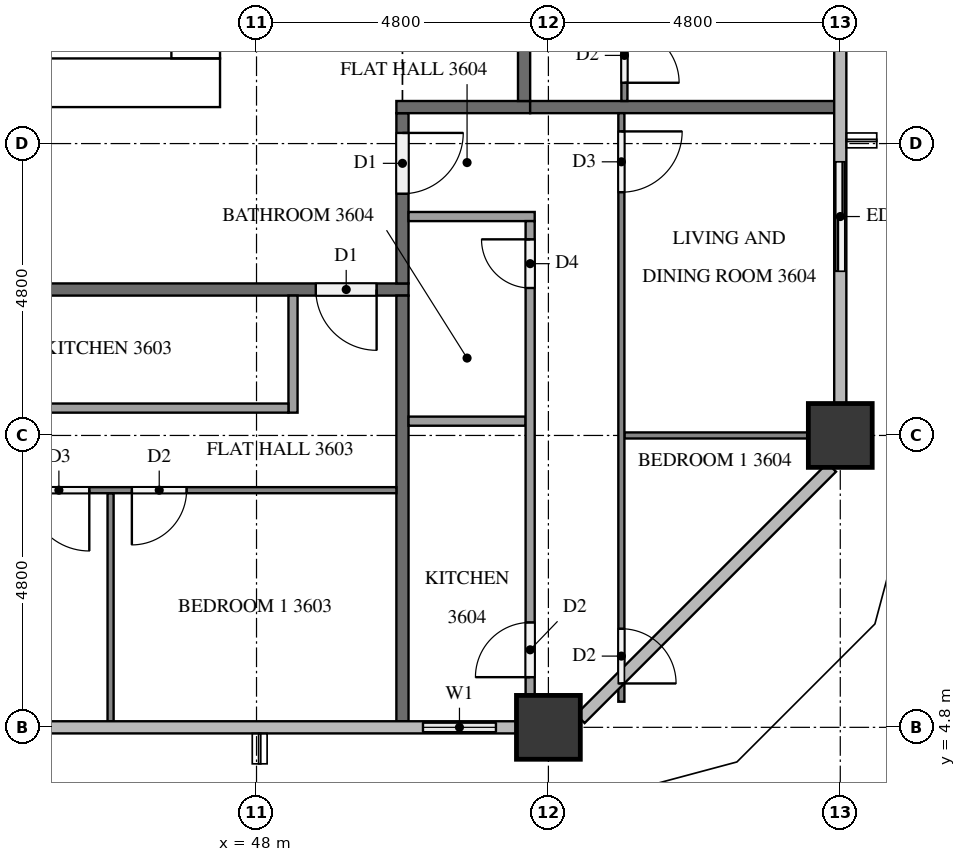
"""IFC4 building model, lengths in metres.
Left out: names, types, materials, properties, quantities, classifications, styles, units other than length and angle.
Written with IfcOpenShell. Run it as: python <this file> out.ifc"""

import sys

from ifc_helpers import new_model, si_unit, direction, frame, frame_2d, origin, origin_2d, place, context, subcontext, project, spatial, rectangle, extrude, element, fill, save


model = new_model("IFC4")
c1 = context("Model", 3, precision=1e-05, world=origin(), true_north=direction((0.0, 1.0)))
c2 = subcontext(c1, "Body", "Model", "MODEL_VIEW")
j1 = project(units=[si_unit("LENGTHUNIT", "METRE"), si_unit("PLANEANGLEUNIT", "RADIAN")], contexts=[c1])
p1 = place(None, origin())
s1 = spatial("IfcSite", under=j1, at=p1, CompositionType="ELEMENT")
p2 = place(p1, origin())
s2 = spatial("IfcBuilding", under=s1, at=p2, CompositionType="ELEMENT")
p3 = place(p2, frame((0.0, 0.0, 140.1)))
s3 = spatial("IfcBuildingStorey", under=s2, at=p3, CompositionType="ELEMENT", Elevation=140.1)
p4 = place(p3, frame((15.0, 15.4, 0.0), z_axis=(0.0, 0.0, 1.0), x_axis=(1.0, 0.0, 0.0)))
e1 = element("IfcWall", 1, at=p4, inside=s3, PredefinedType="SHEAR", context=c2, shape_type="SweptSolid", body=[
    extrude(rectangle(XDim=32.4, YDim=0.8, at=frame_2d((16.2, 0.0))), origin(), (0.0, 0.0, 1.0), 3.1),
])
p5 = place(p4, frame((15.3, 0.0, 0.0)))
e2 = element("IfcOpeningElement", 2, at=p5, cuts=e1, PredefinedType="OPENING", context=c2, shape_type="SweptSolid", body=[
    extrude(rectangle(XDim=1.8, YDim=2.1, at=frame_2d((0.9, 1.05))), frame((0.0, 0.41, 0.0), z_axis=(0.0, -1.0, 0.0), x_axis=(1.0, 0.0, 0.0)), (0.0, 0.0, 1.0), 0.82),
])
p6 = place(p3, frame((47.0, 15.8, 0.0), z_axis=(0.0, 0.0, 1.0), x_axis=(0.0, 1.0, 0.0)))
e3 = element("IfcWall", 3, at=p6, inside=s3, PredefinedType="SHEAR", context=c2, shape_type="SweptSolid", body=[
    extrude(rectangle(XDim=21.2, YDim=0.8, at=frame_2d((10.6, 0.0))), origin(), (0.0, 0.0, 1.0), 3.1),
])
p7 = place(p6, frame((10.3, 0.0, 0.0)))
e4 = element("IfcOpeningElement", 4, at=p7, cuts=e3, PredefinedType="OPENING", context=c2, shape_type="SweptSolid", body=[
    extrude(rectangle(XDim=1.2, YDim=2.1, at=frame_2d((0.6, 1.05))), frame((0.0, 0.41, 0.0), z_axis=(0.0, -1.0, 0.0), x_axis=(1.0, 0.0, 0.0)), (0.0, 0.0, 1.0), 0.82),
])
for number, where, z_axis, x_axis in (
    (5, (52.8, 4.8, 0.0), (0.0, 0.0, 1.0), (1.0, 0.0, 0.0)),
    (6, (57.6, 9.6, 0.0), (0.0, 0.0, 1.0), (1.0, 0.0, 0.0)),
):
    element("IfcColumn", number, at=place(p3, frame(where, z_axis=z_axis, x_axis=x_axis)), inside=s3, PredefinedType="COLUMN", context=c2, shape_type="SweptSolid", body=[
        extrude(rectangle(XDim=1.05, YDim=1.05, at=origin_2d()), origin(), (0.0, 0.0, 1.0), 3.1),
    ])
p8 = place(p3, frame((50.4, 4.8, 0.0), z_axis=(0.0, 0.0, 1.0), x_axis=(1.0, 0.0, 0.0)))
e7 = element("IfcWall", 7, at=p8, inside=s3, PredefinedType="SOLIDWALL", context=c2, shape_type="SweptSolid", body=[
    extrude(rectangle(XDim=1.875, YDim=0.15, at=frame_2d((0.938, 0.0))), origin(), (0.0, 0.0, 1.0), 3.1),
])
p9 = place(p8, frame((0.337, 0.0, 0.9)))
e8 = element("IfcOpeningElement", 8, at=p9, cuts=e7, PredefinedType="OPENING", context=c2, shape_type="SweptSolid", body=[
    extrude(rectangle(XDim=1.2, YDim=1.4, at=frame_2d((0.6, 0.7))), frame((0.0, 0.085, 0.0), z_axis=(0.0, -1.0, 0.0), x_axis=(1.0, 0.0, 0.0)), (0.0, 0.0, 1.0), 0.17),
])
p10 = place(p3, frame((57.6, 12.0, 0.0), z_axis=(0.0, 0.0, 1.0), x_axis=(0.0, 1.0, 0.0)))
e9 = element("IfcWall", 9, at=p10, inside=s3, PredefinedType="SOLIDWALL", context=c2, shape_type="SweptSolid", body=[
    extrude(rectangle(XDim=2.4, YDim=0.15, at=frame_2d((1.2, 0.0))), origin(), (0.0, 0.0, 1.0), 3.1),
])
p11 = place(p10, frame((0.3, 0.0, 0.0)))
e10 = element("IfcOpeningElement", 10, at=p11, cuts=e9, PredefinedType="OPENING", context=c2, shape_type="SweptSolid", body=[
    extrude(rectangle(XDim=1.8, YDim=2.4, at=frame_2d((0.9, 1.2))), frame((0.0, 0.085, 0.0), z_axis=(0.0, -1.0, 0.0), x_axis=(1.0, 0.0, 0.0)), (0.0, 0.0, 1.0), 0.17),
])
p12 = place(p3, frame((50.5, 12.0, 0.0), z_axis=(0.0, 0.0, 1.0), x_axis=(-1.0, 0.0, 0.0)))
e11 = element("IfcWall", 11, at=p12, inside=s3, PredefinedType="PARTITIONING", context=c2, shape_type="SweptSolid", body=[
    extrude(rectangle(XDim=38.6, YDim=0.2, at=frame_2d((19.3, 0.0))), origin(), (0.0, 0.0, 1.0), 3.1),
])
p13 = place(p12, frame((37.075, 0.0, 0.0)))
e12 = element("IfcOpeningElement", 12, at=p13, cuts=e11, PredefinedType="OPENING", context=c2, shape_type="SweptSolid", body=[
    extrude(rectangle(XDim=1.0, YDim=2.1, at=frame_2d((0.5, 1.05))), frame((0.0, 0.11, 0.0), z_axis=(0.0, -1.0, 0.0), x_axis=(1.0, 0.0, 0.0)), (0.0, 0.0, 1.0), 0.22),
])
p14 = place(p12, frame((27.475, 0.0, 0.0)))
e13 = element("IfcOpeningElement", 13, at=p14, cuts=e11, PredefinedType="OPENING", context=c2, shape_type="SweptSolid", body=[
    extrude(rectangle(XDim=1.0, YDim=2.1, at=frame_2d((0.5, 1.05))), frame((0.0, 0.11, 0.0), z_axis=(0.0, -1.0, 0.0), x_axis=(1.0, 0.0, 0.0)), (0.0, 0.0, 1.0), 0.22),
])
p15 = place(p12, frame((0.525, 0.0, 0.0)))
e14 = element("IfcOpeningElement", 14, at=p15, cuts=e11, PredefinedType="OPENING", context=c2, shape_type="SweptSolid", body=[
    extrude(rectangle(XDim=1.0, YDim=2.1, at=frame_2d((0.5, 1.05))), frame((0.0, 0.11, 0.0), z_axis=(0.0, -1.0, 0.0), x_axis=(1.0, 0.0, 0.0)), (0.0, 0.0, 1.0), 0.22),
])
p16 = place(p3, frame((50.4, 14.9, 0.0), z_axis=(0.0, 0.0, 1.0), x_axis=(0.0, -1.0, 0.0)))
e15 = element("IfcWall", 15, at=p16, inside=s3, PredefinedType="PARTITIONING", context=c2, shape_type="SweptSolid", body=[
    extrude(rectangle(XDim=2.8, YDim=0.2, at=frame_2d((1.4, 0.0))), origin(), (0.0, 0.0, 1.0), 3.1),
])
p17 = place(p16, frame((0.325, 0.0, 0.0)))
e16 = element("IfcOpeningElement", 16, at=p17, cuts=e15, PredefinedType="OPENING", context=c2, shape_type="SweptSolid", body=[
    extrude(rectangle(XDim=1.0, YDim=2.1, at=frame_2d((0.5, 1.05))), frame((0.0, 0.11, 0.0), z_axis=(0.0, -1.0, 0.0), x_axis=(1.0, 0.0, 0.0)), (0.0, 0.0, 1.0), 0.22),
])
p18 = place(p3, frame((50.3, 15.0, 0.0), z_axis=(0.0, 0.0, 1.0), x_axis=(1.0, 0.0, 0.0)))
e17 = element("IfcWall", 17, at=p18, inside=s3, PredefinedType="PARTITIONING", context=c2, shape_type="SweptSolid", body=[
    extrude(rectangle(XDim=2.2, YDim=0.2, at=frame_2d((1.1, 0.0))), origin(), (0.0, 0.0, 1.0), 3.1),
])
p19 = place(p3, frame((52.4, 37.7, 0.0), z_axis=(0.0, 0.0, 1.0), x_axis=(0.0, -1.0, 0.0)))
e18 = element("IfcWall", 18, at=p19, inside=s3, PredefinedType="PARTITIONING", context=c2, shape_type="SweptSolid", body=[
    extrude(rectangle(XDim=22.6, YDim=0.2, at=frame_2d((11.3, 0.0))), origin(), (0.0, 0.0, 1.0), 3.1),
])
p20 = place(p19, frame((14.125, 0.0, 0.0)))
e19 = element("IfcOpeningElement", 19, at=p20, cuts=e18, PredefinedType="OPENING", context=c2, shape_type="SweptSolid", body=[
    extrude(rectangle(XDim=1.0, YDim=2.1, at=frame_2d((0.5, 1.05))), frame((0.0, 0.11, 0.0), z_axis=(0.0, -1.0, 0.0), x_axis=(1.0, 0.0, 0.0)), (0.0, 0.0, 1.0), 0.22),
])
p21 = place(p19, frame((0.325, 0.0, 0.0)))
e20 = element("IfcOpeningElement", 20, at=p21, cuts=e18, PredefinedType="OPENING", context=c2, shape_type="SweptSolid", body=[
    extrude(rectangle(XDim=1.0, YDim=2.1, at=frame_2d((0.5, 1.05))), frame((0.0, 0.11, 0.0), z_axis=(0.0, -1.0, 0.0), x_axis=(1.0, 0.0, 0.0)), (0.0, 0.0, 1.0), 0.22),
])
p22 = place(p3, frame((50.4, 11.9, 0.0), z_axis=(0.0, 0.0, 1.0), x_axis=(0.0, -1.0, 0.0)))
e21 = element("IfcWall", 21, at=p22, inside=s3, PredefinedType="PARTITIONING", context=c2, shape_type="SweptSolid", body=[
    extrude(rectangle(XDim=7.0, YDim=0.2, at=frame_2d((3.5, 0.0))), origin(), (0.0, 0.0, 1.0), 3.1),
])
p23 = place(p3, frame((52.5, 15.0, 0.0), z_axis=(0.0, 0.0, 1.0), x_axis=(1.0, 0.0, 0.0)))
e22 = element("IfcWall", 22, at=p23, inside=s3, PredefinedType="PARTITIONING", context=c2, shape_type="SweptSolid", body=[
    extrude(rectangle(XDim=5.0, YDim=0.2, at=frame_2d((2.5, 0.0))), origin(), (0.0, 0.0, 1.0), 3.1),
])
p24 = place(p3, frame((45.6, 8.65, 0.0), z_axis=(0.0, 0.0, 1.0), x_axis=(0.0, -1.0, 0.0)))
e23 = element("IfcWall", 23, at=p24, inside=s3, PredefinedType="PARTITIONING", context=c2, shape_type="SweptSolid", body=[
    extrude(rectangle(XDim=3.75, YDim=0.1, at=frame_2d((1.875, 0.0))), origin(), (0.0, 0.0, 1.0), 3.1),
])
p25 = place(p3, frame((50.3, 8.7, 0.0), z_axis=(0.0, 0.0, 1.0), x_axis=(-1.0, 0.0, 0.0)))
e24 = element("IfcWall", 24, at=p25, inside=s3, PredefinedType="PARTITIONING", context=c2, shape_type="SweptSolid", body=[
    extrude(rectangle(XDim=11.8, YDim=0.1, at=frame_2d((5.9, 0.0))), origin(), (0.0, 0.0, 1.0), 3.1),
])
p26 = place(p25, frame((3.45, 0.0, 0.0)))
e25 = element("IfcOpeningElement", 25, at=p26, cuts=e24, PredefinedType="OPENING", context=c2, shape_type="SweptSolid", body=[
    extrude(rectangle(XDim=0.9, YDim=2.1, at=frame_2d((0.45, 1.05))), frame((0.0, 0.06, 0.0), z_axis=(0.0, -1.0, 0.0), x_axis=(1.0, 0.0, 0.0)), (0.0, 0.0, 1.0), 0.12),
])
p27 = place(p25, frame((5.05, 0.0, 0.0)))
e26 = element("IfcOpeningElement", 26, at=p27, cuts=e24, PredefinedType="OPENING", context=c2, shape_type="SweptSolid", body=[
    extrude(rectangle(XDim=1.0, YDim=2.1, at=frame_2d((0.5, 1.05))), frame((0.0, 0.06, 0.0), z_axis=(0.0, -1.0, 0.0), x_axis=(1.0, 0.0, 0.0)), (0.0, 0.0, 1.0), 0.12),
])
p28 = place(p3, frame((48.6, 11.9, 0.0), z_axis=(0.0, 0.0, 1.0), x_axis=(0.0, -1.0, 0.0)))
e27 = element("IfcWall", 27, at=p28, inside=s3, PredefinedType="PARTITIONING", context=c2, shape_type="SweptSolid", body=[
    extrude(rectangle(XDim=1.925, YDim=0.15, at=frame_2d((0.962, 0.0))), origin(), (0.0, 0.0, 1.0), 3.1),
])
p29 = place(p3, frame((38.5, 10.05, 0.0), z_axis=(0.0, 0.0, 1.0), x_axis=(1.0, 0.0, 0.0)))
e28 = element("IfcWall", 28, at=p29, inside=s3, PredefinedType="PARTITIONING", context=c2, shape_type="SweptSolid", body=[
    extrude(rectangle(XDim=10.025, YDim=0.15, at=frame_2d((5.012, 0.0))), origin(), (0.0, 0.0, 1.0), 3.1),
])
p30 = place(p29, frame((4.335, 0.0, 0.0)))
e29 = element("IfcOpeningElement", 29, at=p30, cuts=e28, PredefinedType="OPENING", context=c2, shape_type="SweptSolid", body=[
    extrude(rectangle(XDim=0.9, YDim=2.1, at=frame_2d((0.45, 1.05))), frame((0.0, 0.085, 0.0), z_axis=(0.0, -1.0, 0.0), x_axis=(1.0, 0.0, 0.0)), (0.0, 0.0, 1.0), 0.17),
])
p31 = place(p29, frame((2.885, 0.0, 0.0)))
e30 = element("IfcOpeningElement", 30, at=p31, cuts=e28, PredefinedType="OPENING", context=c2, shape_type="SweptSolid", body=[
    extrude(rectangle(XDim=0.8, YDim=2.1, at=frame_2d((0.4, 1.05))), frame((0.0, 0.085, 0.0), z_axis=(0.0, -1.0, 0.0), x_axis=(1.0, 0.0, 0.0)), (0.0, 0.0, 1.0), 0.17),
])
p32 = place(p3, frame((54.05, 9.6, 0.0), z_axis=(0.0, 0.0, 1.0), x_axis=(1.0, 0.0, 0.0)))
e31 = element("IfcWall", 31, at=p32, inside=s3, PredefinedType="PARTITIONING", context=c2, shape_type="SweptSolid", body=[
    extrude(rectangle(XDim=3.025, YDim=0.1, at=frame_2d((1.512, 0.0))), origin(), (0.0, 0.0, 1.0), 3.1),
])
p33 = place(p3, frame((54.0, 14.9, 0.0), z_axis=(0.0, 0.0, 1.0), x_axis=(0.0, -1.0, 0.0)))
e32 = element("IfcWall", 32, at=p33, inside=s3, PredefinedType="PARTITIONING", context=c2, shape_type="SweptSolid", body=[
    extrude(rectangle(XDim=9.678, YDim=0.1, at=frame_2d((4.839, 0.0))), origin(), (0.0, 0.0, 1.0), 3.1),
])
p34 = place(p33, frame((0.3, 0.0, 0.0)))
e33 = element("IfcOpeningElement", 33, at=p34, cuts=e32, PredefinedType="OPENING", context=c2, shape_type="SweptSolid", body=[
    extrude(rectangle(XDim=1.0, YDim=2.1, at=frame_2d((0.5, 1.05))), frame((0.0, 0.06, 0.0), z_axis=(0.0, -1.0, 0.0), x_axis=(1.0, 0.0, 0.0)), (0.0, 0.0, 1.0), 0.12),
])
p35 = place(p33, frame((8.479, 0.0, 0.0)))
e34 = element("IfcOpeningElement", 34, at=p35, cuts=e32, PredefinedType="OPENING", context=c2, shape_type="SweptSolid", body=[
    extrude(rectangle(XDim=0.9, YDim=2.1, at=frame_2d((0.45, 1.05))), frame((0.0, 0.06, 0.0), z_axis=(0.0, -1.0, 0.0), x_axis=(1.0, 0.0, 0.0)), (0.0, 0.0, 1.0), 0.12),
])
p36 = place(p3, frame((50.5, 9.835, 0.0), z_axis=(0.0, 0.0, 1.0), x_axis=(1.0, 0.0, 0.0)))
e35 = element("IfcWall", 35, at=p36, inside=s3, PredefinedType="PARTITIONING", context=c2, shape_type="SweptSolid", body=[
    extrude(rectangle(XDim=1.925, YDim=0.15, at=frame_2d((0.962, 0.0))), origin(), (0.0, 0.0, 1.0), 3.1),
])
p37 = place(p3, frame((50.5, 13.2, 0.0), z_axis=(0.0, 0.0, 1.0), x_axis=(1.0, 0.0, 0.0)))
e36 = element("IfcWall", 36, at=p37, inside=s3, PredefinedType="PARTITIONING", context=c2, shape_type="SweptSolid", body=[
    extrude(rectangle(XDim=2.075, YDim=0.15, at=frame_2d((1.038, 0.0))), origin(), (0.0, 0.0, 1.0), 3.1),
])
p38 = place(p3, frame((52.5, 5.325, 0.0), z_axis=(0.0, 0.0, 1.0), x_axis=(0.0, 1.0, 0.0)))
e37 = element("IfcWall", 37, at=p38, inside=s3, PredefinedType="PARTITIONING", context=c2, shape_type="SweptSolid", body=[
    extrude(rectangle(XDim=7.8, YDim=0.15, at=frame_2d((3.9, 0.0))), origin(), (0.0, 0.0, 1.0), 3.1),
])
p39 = place(p38, frame((6.7, 0.0, 0.0)))
e38 = element("IfcOpeningElement", 38, at=p39, cuts=e37, PredefinedType="OPENING", context=c2, shape_type="SweptSolid", body=[
    extrude(rectangle(XDim=0.8, YDim=2.1, at=frame_2d((0.4, 1.05))), frame((0.0, 0.085, 0.0), z_axis=(0.0, -1.0, 0.0), x_axis=(1.0, 0.0, 0.0)), (0.0, 0.0, 1.0), 0.17),
])
p40 = place(p38, frame((0.3, 0.0, 0.0)))
e39 = element("IfcOpeningElement", 39, at=p40, cuts=e37, PredefinedType="OPENING", context=c2, shape_type="SweptSolid", body=[
    extrude(rectangle(XDim=0.9, YDim=2.1, at=frame_2d((0.45, 1.05))), frame((0.0, 0.085, 0.0), z_axis=(0.0, -1.0, 0.0), x_axis=(1.0, 0.0, 0.0)), (0.0, 0.0, 1.0), 0.17),
])
p41 = place(p3, frame((54.05, 23.9, 0.0), z_axis=(0.0, 0.0, 1.0), x_axis=(0.0, -1.0, 0.0)))
e40 = element("IfcWall", 40, at=p41, inside=s3, PredefinedType="PARTITIONING", context=c2, shape_type="SweptSolid", body=[
    extrude(rectangle(XDim=8.8, YDim=0.1, at=frame_2d((4.4, 0.0))), origin(), (0.0, 0.0, 1.0), 3.1),
])
p42 = place(p41, frame((3.35, 0.0, 0.0)))
e41 = element("IfcOpeningElement", 41, at=p42, cuts=e40, PredefinedType="OPENING", context=c2, shape_type="SweptSolid", body=[
    extrude(rectangle(XDim=1.0, YDim=2.1, at=frame_2d((0.5, 1.05))), frame((0.0, 0.06, 0.0), z_axis=(0.0, -1.0, 0.0), x_axis=(1.0, 0.0, 0.0)), (0.0, 0.0, 1.0), 0.12),
])
p43 = place(p41, frame((5.05, 0.0, 0.0)))
e42 = element("IfcOpeningElement", 42, at=p43, cuts=e40, PredefinedType="OPENING", context=c2, shape_type="SweptSolid", body=[
    extrude(rectangle(XDim=0.8, YDim=2.1, at=frame_2d((0.4, 1.05))), frame((0.0, 0.06, 0.0), z_axis=(0.0, -1.0, 0.0), x_axis=(1.0, 0.0, 0.0)), (0.0, 0.0, 1.0), 0.12),
])
p44 = place(p41, frame((7.6, 0.0, 0.0)))
e43 = element("IfcOpeningElement", 43, at=p44, cuts=e40, PredefinedType="OPENING", context=c2, shape_type="SweptSolid", body=[
    extrude(rectangle(XDim=0.9, YDim=2.1, at=frame_2d((0.45, 1.05))), frame((0.0, 0.06, 0.0), z_axis=(0.0, -1.0, 0.0), x_axis=(1.0, 0.0, 0.0)), (0.0, 0.0, 1.0), 0.12),
])
p45 = place(p9, origin())
e44 = element("IfcWindow", 44, at=p45, inside=s3, PartitioningType="SINGLE_PANEL", PredefinedType="WINDOW", context=c2, shape_type="SweptSolid", body=[
    extrude(rectangle(XDim=1.2, YDim=1.4, at=frame_2d((0.6, 0.7))), frame((0.0, 0.03, 0.0), z_axis=(0.0, -1.0, 0.0), x_axis=(1.0, 0.0, 0.0)), (0.0, 0.0, 1.0), 0.06),
])
fill(e8, e44)
p46 = place(p11, origin())
e45 = element("IfcDoor", 45, at=p46, inside=s3, OperationType="SLIDING_TO_RIGHT", PredefinedType="DOOR", context=c2, shape_type="SweptSolid", body=[
    extrude(rectangle(XDim=1.8, YDim=2.4, at=frame_2d((0.9, 1.2))), frame((0.0, 0.025, 0.0), z_axis=(0.0, -1.0, 0.0), x_axis=(1.0, 0.0, 0.0)), (0.0, 0.0, 1.0), 0.05),
])
fill(e10, e45)
p47 = place(p15, origin())
e46 = element("IfcDoor", 46, at=p47, inside=s3, OperationType="SINGLE_SWING_LEFT", PredefinedType="DOOR", context=c2, shape_type="SweptSolid", body=[
    extrude(rectangle(XDim=1.0, YDim=2.1, at=frame_2d((0.5, 1.05))), frame((0.0, 0.025, 0.0), z_axis=(0.0, -1.0, 0.0), x_axis=(1.0, 0.0, 0.0)), (0.0, 0.0, 1.0), 0.05),
])
fill(e14, e46)
p48 = place(p17, origin())
e47 = element("IfcDoor", 47, at=p48, inside=s3, OperationType="SINGLE_SWING_LEFT", PredefinedType="DOOR", context=c2, shape_type="SweptSolid", body=[
    extrude(rectangle(XDim=1.0, YDim=2.1, at=frame_2d((0.5, 1.05))), frame((0.0, 0.025, 0.0), z_axis=(0.0, -1.0, 0.0), x_axis=(1.0, 0.0, 0.0)), (0.0, 0.0, 1.0), 0.05),
])
fill(e16, e47)
p49 = place(p26, origin())
e48 = element("IfcDoor", 48, at=p49, inside=s3, OperationType="SINGLE_SWING_RIGHT", PredefinedType="DOOR", context=c2, shape_type="SweptSolid", body=[
    extrude(rectangle(XDim=0.9, YDim=2.1, at=frame_2d((0.45, 1.05))), frame((0.0, 0.025, 0.0), z_axis=(0.0, -1.0, 0.0), x_axis=(1.0, 0.0, 0.0)), (0.0, 0.0, 1.0), 0.05),
])
fill(e25, e48)
p50 = place(p27, origin())
e49 = element("IfcDoor", 49, at=p50, inside=s3, OperationType="SINGLE_SWING_LEFT", PredefinedType="DOOR", context=c2, shape_type="SweptSolid", body=[
    extrude(rectangle(XDim=1.0, YDim=2.1, at=frame_2d((0.5, 1.05))), frame((0.0, 0.025, 0.0), z_axis=(0.0, -1.0, 0.0), x_axis=(1.0, 0.0, 0.0)), (0.0, 0.0, 1.0), 0.05),
])
fill(e26, e49)
p51 = place(p34, origin())
e50 = element("IfcDoor", 50, at=p51, inside=s3, OperationType="SINGLE_SWING_LEFT", PredefinedType="DOOR", context=c2, shape_type="SweptSolid", body=[
    extrude(rectangle(XDim=1.0, YDim=2.1, at=frame_2d((0.5, 1.05))), frame((0.0, 0.025, 0.0), z_axis=(0.0, -1.0, 0.0), x_axis=(1.0, 0.0, 0.0)), (0.0, 0.0, 1.0), 0.05),
])
fill(e33, e50)
p52 = place(p35, origin())
e51 = element("IfcDoor", 51, at=p52, inside=s3, OperationType="SINGLE_SWING_RIGHT", PredefinedType="DOOR", context=c2, shape_type="SweptSolid", body=[
    extrude(rectangle(XDim=0.9, YDim=2.1, at=frame_2d((0.45, 1.05))), frame((0.0, 0.025, 0.0), z_axis=(0.0, -1.0, 0.0), x_axis=(1.0, 0.0, 0.0)), (0.0, 0.0, 1.0), 0.05),
])
fill(e34, e51)
p53 = place(p39, origin())
e52 = element("IfcDoor", 52, at=p53, inside=s3, OperationType="SINGLE_SWING_RIGHT", PredefinedType="DOOR", context=c2, shape_type="SweptSolid", body=[
    extrude(rectangle(XDim=0.8, YDim=2.1, at=frame_2d((0.4, 1.05))), frame((0.0, 0.025, 0.0), z_axis=(0.0, -1.0, 0.0), x_axis=(1.0, 0.0, 0.0)), (0.0, 0.0, 1.0), 0.05),
])
fill(e38, e52)
p54 = place(p40, origin())
e53 = element("IfcDoor", 53, at=p54, inside=s3, OperationType="SINGLE_SWING_LEFT", PredefinedType="DOOR", context=c2, shape_type="SweptSolid", body=[
    extrude(rectangle(XDim=0.9, YDim=2.1, at=frame_2d((0.45, 1.05))), frame((0.0, 0.025, 0.0), z_axis=(0.0, -1.0, 0.0), x_axis=(1.0, 0.0, 0.0)), (0.0, 0.0, 1.0), 0.05),
])
fill(e39, e53)
p55 = place(p44, origin())
e54 = element("IfcDoor", 54, at=p55, inside=s3, OperationType="SINGLE_SWING_RIGHT", PredefinedType="DOOR", context=c2, shape_type="SweptSolid", body=[
    extrude(rectangle(XDim=0.9, YDim=2.1, at=frame_2d((0.45, 1.05))), frame((0.0, 0.025, 0.0), z_axis=(0.0, -1.0, 0.0), x_axis=(1.0, 0.0, 0.0)), (0.0, 0.0, 1.0), 0.05),
])
fill(e43, e54)
save(model, sys.argv[1])
